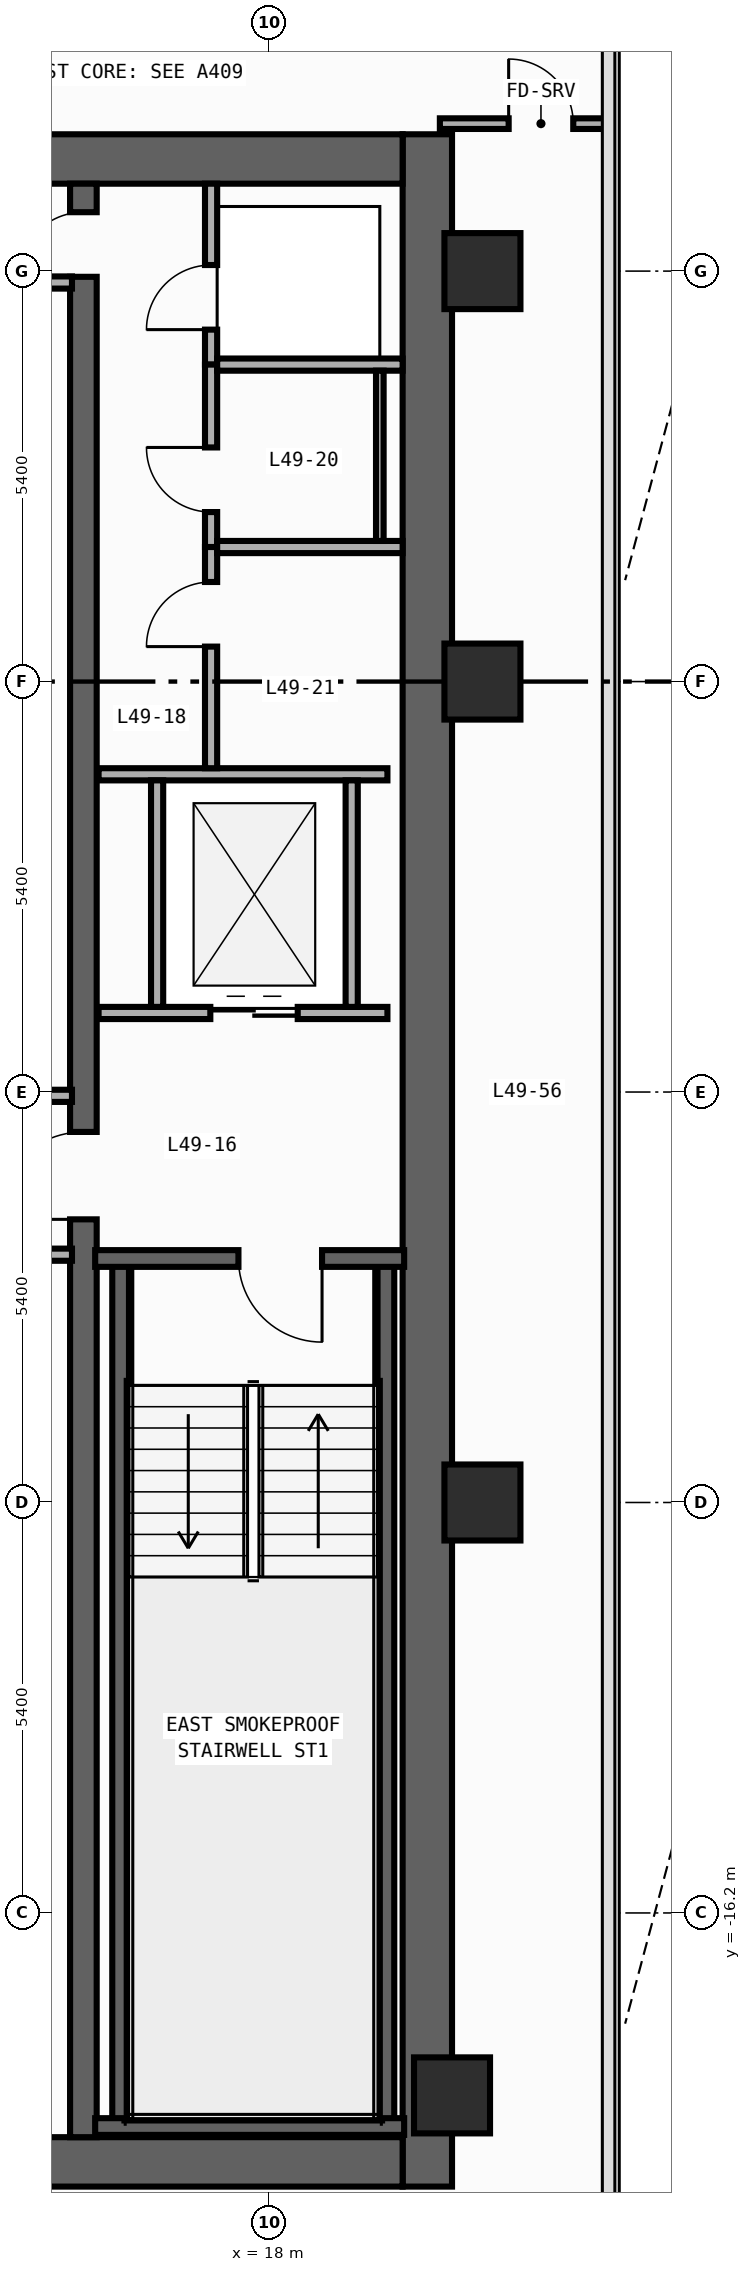
"""IFC4 building model, lengths in metres.
Left out: names, types, materials, properties, quantities, classifications, styles, units other than length and angle.
Written with IfcOpenShell. Run it as: python <this file> out.ifc"""

import sys

from ifc_helpers import new_model, si_unit, direction, frame, frame_2d, origin, origin_2d, place, context, subcontext, project, spatial, rectangle, extrude, element, fill, save


model = new_model("IFC4")
c1 = context("Model", 3, precision=1e-05, world=origin(), true_north=direction((0.0, 1.0)))
c2 = subcontext(c1, "Body", "Model", "MODEL_VIEW")
j1 = project(units=[si_unit("LENGTHUNIT", "METRE"), si_unit("PLANEANGLEUNIT", "RADIAN")], contexts=[c1])
p1 = place(None, origin())
s1 = spatial("IfcSite", under=j1, at=p1, CompositionType="ELEMENT")
p2 = place(p1, origin())
s2 = spatial("IfcBuilding", under=s1, at=p2, CompositionType="ELEMENT")
p3 = place(p2, frame((0.0, 0.0, 210.6)))
s3 = spatial("IfcBuildingStorey", under=s2, at=p3, CompositionType="ELEMENT", Elevation=210.6)
p4 = place(p3, frame((20.075, -19.8, 0.0), z_axis=(0.0, 0.0, 1.0), x_axis=(0.0, 1.0, 0.0)))
e1 = element("IfcWall", 1, at=p4, inside=s3, PredefinedType="SHEAR", context=c2, shape_type="SweptSolid", body=[
    extrude(rectangle(XDim=27.0, YDim=0.65, at=frame_2d((13.5, 0.0))), origin(), (0.0, 0.0, 1.0), 3.45),
])
for number, where, z_axis, x_axis in (
    (2, (12.65, -19.475, 0.0), (0.0, 0.0, 1.0), (1.0, 0.0, 0.0)),
    (3, (12.65, 6.875, 0.0), (0.0, 0.0, 1.0), (1.0, 0.0, 0.0)),
):
    element("IfcWall", number, at=place(p3, frame(where, z_axis=z_axis, x_axis=x_axis)), inside=s3, PredefinedType="SHEAR", context=c2, shape_type="SweptSolid", body=[
        extrude(rectangle(XDim=7.1, YDim=0.65, at=frame_2d((3.55, 0.0))), origin(), (0.0, 0.0, 1.0), 3.45),
    ])
p5 = place(p3, frame((15.55, -19.15, 0.0), z_axis=(0.0, 0.0, 1.0), x_axis=(0.0, 1.0, 0.0)))
e4 = element("IfcWall", 4, at=p5, inside=s3, PredefinedType="SHEAR", context=c2, shape_type="SweptSolid", body=[
    extrude(rectangle(XDim=25.7, YDim=0.35, at=frame_2d((12.85, 0.0))), origin(), (0.0, 0.0, 1.0), 3.45),
])
p6 = place(p5, frame((12.075, 0.0, 0.0)))
e5 = element("IfcOpeningElement", 5, at=p6, cuts=e4, PredefinedType="OPENING", context=c2, shape_type="SweptSolid", body=[
    extrude(rectangle(XDim=1.15, YDim=2.2, at=frame_2d((0.575, 1.1))), frame((0.0, 0.185, 0.0), z_axis=(0.0, -1.0, 0.0), x_axis=(1.0, 0.0, 0.0)), (0.0, 0.0, 1.0), 0.37),
])
p7 = place(p5, frame((24.475, 0.0, 0.0)))
e6 = element("IfcOpeningElement", 6, at=p7, cuts=e4, PredefinedType="OPENING", context=c2, shape_type="SweptSolid", body=[
    extrude(rectangle(XDim=0.85, YDim=2.1, at=frame_2d((0.425, 1.05))), frame((0.0, 0.185, 0.0), z_axis=(0.0, -1.0, 0.0), x_axis=(1.0, 0.0, 0.0)), (0.0, 0.0, 1.0), 0.37),
])
for number, where, z_axis, x_axis in (
    (7, (16.04, -19.01, 0.0), (0.0, 0.0, 1.0), (0.0, 1.0, 0.0)),
    (8, (19.53, -19.01, 0.0), (0.0, 0.0, 1.0), (0.0, 1.0, 0.0)),
):
    element("IfcWall", number, at=place(p3, frame(where, z_axis=z_axis, x_axis=x_axis)), inside=s3, PredefinedType="SHEAR", context=c2, shape_type="SweptSolid", body=[
        extrude(rectangle(XDim=11.42, YDim=0.22, at=frame_2d((5.71, 0.0))), origin(), (0.0, 0.0, 1.0), 3.45),
    ])
p8 = place(p3, frame((15.705, -19.01, 0.0), z_axis=(0.0, 0.0, 1.0), x_axis=(1.0, 0.0, 0.0)))
e9 = element("IfcWall", 9, at=p8, inside=s3, PredefinedType="SHEAR", context=c2, shape_type="SweptSolid", body=[
    extrude(rectangle(XDim=4.065, YDim=0.22, at=frame_2d((2.032, 0.0))), origin(), (0.0, 0.0, 1.0), 3.45),
])
p9 = place(p3, frame((19.77, -7.59, 0.0), z_axis=(0.0, 0.0, 1.0), x_axis=(-1.0, 0.0, 0.0)))
e10 = element("IfcWall", 10, at=p9, inside=s3, PredefinedType="SHEAR", context=c2, shape_type="SweptSolid", body=[
    extrude(rectangle(XDim=4.065, YDim=0.22, at=frame_2d((2.032, 0.0))), origin(), (0.0, 0.0, 1.0), 3.45),
])
p10 = place(p9, frame((1.08, 0.0, 0.0)))
e11 = element("IfcOpeningElement", 11, at=p10, cuts=e10, PredefinedType="OPENING", context=c2, shape_type="SweptSolid", body=[
    extrude(rectangle(XDim=1.1, YDim=2.2, at=frame_2d((0.55, 1.1))), frame((0.0, 0.12, 0.0), z_axis=(0.0, -1.0, 0.0), x_axis=(1.0, 0.0, 0.0)), (0.0, 0.0, 1.0), 0.24),
])
for number, where, z_axis, x_axis in (
    (12, (20.4, -18.6, 0.0), (0.0, 0.0, 1.0), (1.0, 0.0, 0.0)),
    (13, (20.8, -10.8, 0.0), (0.0, 0.0, 1.0), (1.0, 0.0, 0.0)),
    (14, (20.8, 0.0, 0.0), (0.0, 0.0, 1.0), (1.0, 0.0, 0.0)),
    (15, (20.8, 5.4, 0.0), (0.0, 0.0, 1.0), (1.0, 0.0, 0.0)),
):
    element("IfcColumn", number, at=place(p3, frame(where, z_axis=z_axis, x_axis=x_axis)), inside=s3, PredefinedType="COLUMN", context=c2, shape_type="SweptSolid", body=[
        extrude(rectangle(XDim=1.0, YDim=1.0, at=origin_2d()), origin(), (0.0, 0.0, 1.0), 3.8),
    ])
p11 = place(p3, frame((15.75, -4.36, 0.0), z_axis=(0.0, 0.0, 1.0), x_axis=(1.0, 0.0, 0.0)))
e16 = element("IfcWall", 16, at=p11, inside=s3, PredefinedType="STANDARD", context=c2, shape_type="SweptSolid", body=[
    extrude(rectangle(XDim=3.8, YDim=0.16, at=frame_2d((1.9, 0.0))), origin(), (0.0, 0.0, 1.0), 3.45),
])
p12 = place(p11, frame((1.47, 0.0, 0.0)))
e17 = element("IfcOpeningElement", 17, at=p12, cuts=e16, PredefinedType="OPENING", context=c2, shape_type="SweptSolid", body=[
    extrude(rectangle(XDim=1.15, YDim=2.2, at=frame_2d((0.575, 1.1))), frame((0.0, 0.09, 0.0), z_axis=(0.0, -1.0, 0.0), x_axis=(1.0, 0.0, 0.0)), (0.0, 0.0, 1.0), 0.18),
])
p13 = place(p3, frame((15.75, -1.22, 0.0), z_axis=(0.0, 0.0, 1.0), x_axis=(1.0, 0.0, 0.0)))
e18 = element("IfcWall", 18, at=p13, inside=s3, PredefinedType="STANDARD", context=c2, shape_type="SweptSolid", body=[
    extrude(rectangle(XDim=3.8, YDim=0.16, at=frame_2d((1.9, 0.0))), origin(), (0.0, 0.0, 1.0), 3.45),
])
for number, where, z_axis, x_axis in (
    (19, (16.52, -4.28, 0.0), (0.0, 0.0, 1.0), (0.0, 1.0, 0.0)),
    (20, (19.08, -4.28, 0.0), (0.0, 0.0, 1.0), (0.0, 1.0, 0.0)),
):
    element("IfcWall", number, at=place(p3, frame(where, z_axis=z_axis, x_axis=x_axis)), inside=s3, PredefinedType="STANDARD", context=c2, shape_type="SweptSolid", body=[
        extrude(rectangle(XDim=2.98, YDim=0.16, at=frame_2d((1.49, 0.0))), origin(), (0.0, 0.0, 1.0), 3.45),
    ])
for number, where, z_axis, x_axis in (
    (21, (12.8, -5.45, 0.0), (0.0, 0.0, 1.0), (1.0, 0.0, 0.0)),
    (22, (12.8, -7.54, 0.0), (0.0, 0.0, 1.0), (1.0, 0.0, 0.0)),
    (23, (12.8, 5.25, 0.0), (0.0, 0.0, 1.0), (1.0, 0.0, 0.0)),
):
    element("IfcWall", number, at=place(p3, frame(where, z_axis=z_axis, x_axis=x_axis)), inside=s3, PredefinedType="STANDARD", context=c2, shape_type="SweptSolid", body=[
        extrude(rectangle(XDim=2.6, YDim=0.16, at=frame_2d((1.3, 0.0))), origin(), (0.0, 0.0, 1.0), 3.45),
    ])
p14 = place(p3, frame((17.23, 4.17, 0.0), z_axis=(0.0, 0.0, 1.0), x_axis=(0.0, 1.0, 0.0)))
e24 = element("IfcWall", 24, at=p14, inside=s3, PredefinedType="PARTITIONING", context=c2, shape_type="SweptSolid", body=[
    extrude(rectangle(XDim=2.38, YDim=0.16, at=frame_2d((1.19, 0.0))), origin(), (0.0, 0.0, 1.0), 3.45),
])
p15 = place(p14, frame((0.46, 0.0, 0.0)))
e25 = element("IfcOpeningElement", 25, at=p15, cuts=e24, PredefinedType="OPENING", context=c2, shape_type="SweptSolid", body=[
    extrude(rectangle(XDim=0.85, YDim=2.1, at=frame_2d((0.425, 1.05))), frame((0.0, 0.09, 0.0), z_axis=(0.0, -1.0, 0.0), x_axis=(1.0, 0.0, 0.0)), (0.0, 0.0, 1.0), 0.18),
])
p16 = place(p3, frame((17.23, 1.77, 0.0), z_axis=(0.0, 0.0, 1.0), x_axis=(0.0, 1.0, 0.0)))
e26 = element("IfcWall", 26, at=p16, inside=s3, PredefinedType="PARTITIONING", context=c2, shape_type="SweptSolid", body=[
    extrude(rectangle(XDim=2.4, YDim=0.16, at=frame_2d((1.2, 0.0))), origin(), (0.0, 0.0, 1.0), 3.45),
])
p17 = place(p16, frame((0.46, 0.0, 0.0)))
e27 = element("IfcOpeningElement", 27, at=p17, cuts=e26, PredefinedType="OPENING", context=c2, shape_type="SweptSolid", body=[
    extrude(rectangle(XDim=0.85, YDim=2.1, at=frame_2d((0.425, 1.05))), frame((0.0, 0.09, 0.0), z_axis=(0.0, -1.0, 0.0), x_axis=(1.0, 0.0, 0.0)), (0.0, 0.0, 1.0), 0.18),
])
p18 = place(p3, frame((17.23, -1.14, 0.0), z_axis=(0.0, 0.0, 1.0), x_axis=(0.0, 1.0, 0.0)))
e28 = element("IfcWall", 28, at=p18, inside=s3, PredefinedType="PARTITIONING", context=c2, shape_type="SweptSolid", body=[
    extrude(rectangle(XDim=2.91, YDim=0.16, at=frame_2d((1.455, 0.0))), origin(), (0.0, 0.0, 1.0), 3.45),
])
p19 = place(p18, frame((1.6, 0.0, 0.0)))
e29 = element("IfcOpeningElement", 29, at=p19, cuts=e28, PredefinedType="OPENING", context=c2, shape_type="SweptSolid", body=[
    extrude(rectangle(XDim=0.85, YDim=2.1, at=frame_2d((0.425, 1.05))), frame((0.0, 0.09, 0.0), z_axis=(0.0, -1.0, 0.0), x_axis=(1.0, 0.0, 0.0)), (0.0, 0.0, 1.0), 0.18),
])
for number, where, z_axis, x_axis in (
    (30, (17.31, 4.17, 0.0), (0.0, 0.0, 1.0), (1.0, 0.0, 0.0)),
    (31, (17.31, 1.77, 0.0), (0.0, 0.0, 1.0), (1.0, 0.0, 0.0)),
):
    element("IfcWall", number, at=place(p3, frame(where, z_axis=z_axis, x_axis=x_axis)), inside=s3, PredefinedType="PARTITIONING", context=c2, shape_type="SweptSolid", body=[
        extrude(rectangle(XDim=2.44, YDim=0.16, at=frame_2d((1.22, 0.0))), origin(), (0.0, 0.0, 1.0), 3.45),
    ])
p20 = place(p3, frame((20.24, 7.34, 0.0), z_axis=(0.0, 0.0, 1.0), x_axis=(1.0, 0.0, 0.0)))
e32 = element("IfcWall", 32, at=p20, inside=s3, PredefinedType="PARTITIONING", context=c2, shape_type="SweptSolid", body=[
    extrude(rectangle(XDim=2.215, YDim=0.14, at=frame_2d((1.107, 0.0))), origin(), (0.0, 0.0, 1.0), 3.45),
])
p21 = place(p20, frame((0.905, 0.0, 0.0)))
e33 = element("IfcOpeningElement", 33, at=p21, cuts=e32, PredefinedType="OPENING", context=c2, shape_type="SweptSolid", body=[
    extrude(rectangle(XDim=0.85, YDim=2.1, at=frame_2d((0.425, 1.05))), frame((0.0, 0.08, 0.0), z_axis=(0.0, -1.0, 0.0), x_axis=(1.0, 0.0, 0.0)), (0.0, 0.0, 1.0), 0.16),
])
p22 = place(p3, frame((19.45, 4.09, 0.0), z_axis=(0.0, 0.0, 1.0), x_axis=(0.0, -1.0, 0.0)))
e34 = element("IfcWall", 34, at=p22, inside=s3, PredefinedType="PARTITIONING", context=c2, shape_type="SweptSolid", body=[
    extrude(rectangle(XDim=2.24, YDim=0.1, at=frame_2d((1.12, 0.0))), origin(), (0.0, 0.0, 1.0), 3.45),
])
p23 = place(p10, origin())
e35 = element("IfcDoor", 35, at=p23, inside=s3, OperationType="SINGLE_SWING_LEFT", PredefinedType="DOOR", context=c2, shape_type="SweptSolid", body=[
    extrude(rectangle(XDim=1.1, YDim=2.2, at=frame_2d((0.55, 1.1))), frame((0.0, 0.025, 0.0), z_axis=(0.0, -1.0, 0.0), x_axis=(1.0, 0.0, 0.0)), (0.0, 0.0, 1.0), 0.05),
])
fill(e11, e35)
p24 = place(p6, origin())
e36 = element("IfcDoor", 36, at=p24, inside=s3, OperationType="SINGLE_SWING_LEFT", PredefinedType="DOOR", context=c2, shape_type="SweptSolid", body=[
    extrude(rectangle(XDim=1.15, YDim=2.2, at=frame_2d((0.575, 1.1))), frame((0.0, 0.025, 0.0), z_axis=(0.0, -1.0, 0.0), x_axis=(1.0, 0.0, 0.0)), (0.0, 0.0, 1.0), 0.05),
])
fill(e5, e36)
p25 = place(p7, origin())
e37 = element("IfcDoor", 37, at=p25, inside=s3, OperationType="SINGLE_SWING_LEFT", PredefinedType="DOOR", context=c2, shape_type="SweptSolid", body=[
    extrude(rectangle(XDim=0.85, YDim=2.1, at=frame_2d((0.425, 1.05))), frame((0.0, 0.025, 0.0), z_axis=(0.0, -1.0, 0.0), x_axis=(1.0, 0.0, 0.0)), (0.0, 0.0, 1.0), 0.05),
])
fill(e6, e37)
p26 = place(p12, origin())
e38 = element("IfcDoor", 38, at=p26, inside=s3, OperationType="DOUBLE_DOOR_SLIDING", PredefinedType="DOOR", context=c2, shape_type="SweptSolid", body=[
    extrude(rectangle(XDim=1.15, YDim=2.2, at=frame_2d((0.575, 1.1))), frame((0.0, 0.025, 0.0), z_axis=(0.0, -1.0, 0.0), x_axis=(1.0, 0.0, 0.0)), (0.0, 0.0, 1.0), 0.05),
])
fill(e17, e38)
p27 = place(p15, origin())
e39 = element("IfcDoor", 39, at=p27, inside=s3, OperationType="SINGLE_SWING_LEFT", PredefinedType="DOOR", context=c2, shape_type="SweptSolid", body=[
    extrude(rectangle(XDim=0.85, YDim=2.1, at=frame_2d((0.425, 1.05))), frame((0.0, 0.025, 0.0), z_axis=(0.0, -1.0, 0.0), x_axis=(1.0, 0.0, 0.0)), (0.0, 0.0, 1.0), 0.05),
])
fill(e25, e39)
p28 = place(p17, origin())
e40 = element("IfcDoor", 40, at=p28, inside=s3, OperationType="SINGLE_SWING_RIGHT", PredefinedType="DOOR", context=c2, shape_type="SweptSolid", body=[
    extrude(rectangle(XDim=0.85, YDim=2.1, at=frame_2d((0.425, 1.05))), frame((0.0, 0.025, 0.0), z_axis=(0.0, -1.0, 0.0), x_axis=(1.0, 0.0, 0.0)), (0.0, 0.0, 1.0), 0.05),
])
fill(e27, e40)
p29 = place(p19, origin())
e41 = element("IfcDoor", 41, at=p29, inside=s3, OperationType="SINGLE_SWING_LEFT", PredefinedType="DOOR", context=c2, shape_type="SweptSolid", body=[
    extrude(rectangle(XDim=0.85, YDim=2.1, at=frame_2d((0.425, 1.05))), frame((0.0, 0.025, 0.0), z_axis=(0.0, -1.0, 0.0), x_axis=(1.0, 0.0, 0.0)), (0.0, 0.0, 1.0), 0.05),
])
fill(e29, e41)
p30 = place(p21, origin())
e42 = element("IfcDoor", 42, at=p30, inside=s3, OperationType="SINGLE_SWING_LEFT", PredefinedType="DOOR", context=c2, shape_type="SweptSolid", body=[
    extrude(rectangle(XDim=0.85, YDim=2.1, at=frame_2d((0.425, 1.05))), frame((0.0, 0.025, 0.0), z_axis=(0.0, -1.0, 0.0), x_axis=(1.0, 0.0, 0.0)), (0.0, 0.0, 1.0), 0.05),
])
fill(e33, e42)
save(model, sys.argv[1])
